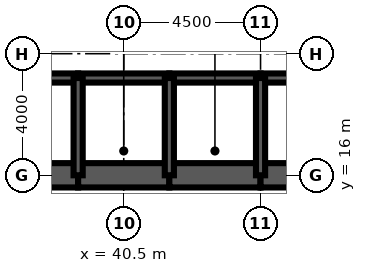
"""IFC4 building model, lengths in metres.
Left out: names, types, materials, properties, quantities, classifications, styles, units other than length and angle.
Written with IfcOpenShell. Run it as: python <this file> out.ifc"""

import sys

from ifc_helpers import new_model, si_unit, direction, frame, frame_2d, origin, place, context, subcontext, project, spatial, rectangle, extrude, element, fill, save


model = new_model("IFC4")
c1 = context("Model", 3, precision=1e-05, world=origin(), true_north=direction((0.0, 1.0)))
c2 = subcontext(c1, "Body", "Model", "MODEL_VIEW")
j1 = project(units=[si_unit("LENGTHUNIT", "METRE"), si_unit("PLANEANGLEUNIT", "RADIAN")], contexts=[c1])
p1 = place(None, origin())
s1 = spatial("IfcSite", under=j1, at=p1, CompositionType="ELEMENT")
p2 = place(p1, origin())
s2 = spatial("IfcBuilding", under=s1, at=p2, CompositionType="ELEMENT")
p3 = place(p2, frame((0.0, 0.0, 240.4)))
s3 = spatial("IfcBuildingStorey", under=s2, at=p3, CompositionType="ELEMENT", Elevation=240.4)
for number, where, z_axis, x_axis in (
    (1, (36.0, 16.0, 0.0), (0.0, 0.0, 1.0), (1.0, 0.0, 0.0)),
    (2, (39.0, 16.0, 0.0), (0.0, 0.0, 1.0), (1.0, 0.0, 0.0)),
    (3, (42.0, 16.0, 0.0), (0.0, 0.0, 1.0), (1.0, 0.0, 0.0)),
):
    element("IfcWall", number, at=place(p3, frame(where, z_axis=z_axis, x_axis=x_axis)), inside=s3, PredefinedType="SHEAR", context=c2, shape_type="SweptSolid", body=[
        extrude(rectangle(XDim=3.0, YDim=0.8, at=frame_2d((1.5, 0.0))), origin(), (0.0, 0.0, 1.0), 4.2),
    ])
p4 = place(p3, frame((45.0, 16.0, 0.0), z_axis=(0.0, 0.0, 1.0), x_axis=(1.0, 0.0, 0.0)))
e4 = element("IfcWall", 4, at=p4, inside=s3, PredefinedType="SHEAR", context=c2, shape_type="SweptSolid", body=[
    extrude(rectangle(XDim=9.4, YDim=0.8, at=frame_2d((4.7, 0.0))), origin(), (0.0, 0.0, 1.0), 4.2),
])
p5 = place(p3, frame((36.0, 19.2, 0.0), z_axis=(0.0, 0.0, 1.0), x_axis=(1.0, 0.0, 0.0)))
e5 = element("IfcWall", 5, at=p5, inside=s3, PredefinedType="SOLIDWALL", context=c2, shape_type="SweptSolid", body=[
    extrude(rectangle(XDim=3.0, YDim=0.3, at=frame_2d((1.5, 0.0))), origin(), (0.0, 0.0, 1.0), 4.2),
])
p6 = place(p5, frame((0.95, 0.0, 0.0)))
e6 = element("IfcOpeningElement", 6, at=p6, cuts=e5, PredefinedType="OPENING", context=c2, shape_type="SweptSolid", body=[
    extrude(rectangle(XDim=1.1, YDim=2.2, at=frame_2d((0.55, 1.1))), frame((0.0, 0.16, 0.0), z_axis=(0.0, -1.0, 0.0), x_axis=(1.0, 0.0, 0.0)), (0.0, 0.0, 1.0), 0.32),
])
p7 = place(p3, frame((39.0, 19.2, 0.0), z_axis=(0.0, 0.0, 1.0), x_axis=(1.0, 0.0, 0.0)))
e7 = element("IfcWall", 7, at=p7, inside=s3, PredefinedType="SOLIDWALL", context=c2, shape_type="SweptSolid", body=[
    extrude(rectangle(XDim=3.0, YDim=0.3, at=frame_2d((1.5, 0.0))), origin(), (0.0, 0.0, 1.0), 4.2),
])
p8 = place(p7, frame((1.0, 0.0, 0.0)))
e8 = element("IfcOpeningElement", 8, at=p8, cuts=e7, PredefinedType="OPENING", context=c2, shape_type="SweptSolid", body=[
    extrude(rectangle(XDim=1.0, YDim=2.1, at=frame_2d((0.5, 1.05))), frame((0.0, 0.16, 0.0), z_axis=(0.0, -1.0, 0.0), x_axis=(1.0, 0.0, 0.0)), (0.0, 0.0, 1.0), 0.32),
])
p9 = place(p3, frame((42.0, 19.2, 0.0), z_axis=(0.0, 0.0, 1.0), x_axis=(1.0, 0.0, 0.0)))
e9 = element("IfcWall", 9, at=p9, inside=s3, PredefinedType="SOLIDWALL", context=c2, shape_type="SweptSolid", body=[
    extrude(rectangle(XDim=3.0, YDim=0.3, at=frame_2d((1.5, 0.0))), origin(), (0.0, 0.0, 1.0), 4.2),
])
p10 = place(p9, frame((1.0, 0.0, 0.0)))
e10 = element("IfcOpeningElement", 10, at=p10, cuts=e9, PredefinedType="OPENING", context=c2, shape_type="SweptSolid", body=[
    extrude(rectangle(XDim=1.0, YDim=2.1, at=frame_2d((0.5, 1.05))), frame((0.0, 0.16, 0.0), z_axis=(0.0, -1.0, 0.0), x_axis=(1.0, 0.0, 0.0)), (0.0, 0.0, 1.0), 0.32),
])
p11 = place(p3, frame((45.0, 19.2, 0.0), z_axis=(0.0, 0.0, 1.0), x_axis=(1.0, 0.0, 0.0)))
e11 = element("IfcWall", 11, at=p11, inside=s3, PredefinedType="SOLIDWALL", context=c2, shape_type="SweptSolid", body=[
    extrude(rectangle(XDim=9.0, YDim=0.3, at=frame_2d((4.5, 0.0))), origin(), (0.0, 0.0, 1.0), 4.2),
])
p12 = place(p11, frame((7.35, 0.0, 0.0)))
e12 = element("IfcOpeningElement", 12, at=p12, cuts=e11, PredefinedType="OPENING", context=c2, shape_type="SweptSolid", body=[
    extrude(rectangle(XDim=1.0, YDim=2.1, at=frame_2d((0.5, 1.05))), frame((0.0, 0.16, 0.0), z_axis=(0.0, -1.0, 0.0), x_axis=(1.0, 0.0, 0.0)), (0.0, 0.0, 1.0), 0.32),
])
for number, where, z_axis, x_axis in (
    (13, (39.0, 16.0, 0.0), (0.0, 0.0, 1.0), (0.0, 1.0, 0.0)),
    (14, (42.0, 16.0, 0.0), (0.0, 0.0, 1.0), (0.0, 1.0, 0.0)),
    (15, (45.0, 16.0, 0.0), (0.0, 0.0, 1.0), (0.0, 1.0, 0.0)),
):
    element("IfcWall", number, at=place(p3, frame(where, z_axis=z_axis, x_axis=x_axis)), inside=s3, PredefinedType="SOLIDWALL", context=c2, shape_type="SweptSolid", body=[
        extrude(rectangle(XDim=3.2, YDim=0.3, at=frame_2d((1.6, 0.0))), origin(), (0.0, 0.0, 1.0), 4.2),
    ])
p13 = place(p3, frame((39.15, 17.35, 0.0), z_axis=(0.0, 0.0, 1.0), x_axis=(1.0, 0.0, 0.0)))
e16 = element("IfcWall", 16, at=p13, inside=s3, PredefinedType="SOLIDWALL", context=c2, shape_type="SweptSolid", body=[
    extrude(rectangle(XDim=2.7, YDim=0.3, at=frame_2d((1.35, 0.0))), origin(), (0.0, 0.0, 1.0), 4.04),
])
p14 = place(p13, frame((0.85, 0.0, 0.0)))
e17 = element("IfcOpeningElement", 17, at=p14, cuts=e16, PredefinedType="OPENING", context=c2, shape_type="SweptSolid", body=[
    extrude(rectangle(XDim=1.0, YDim=2.1, at=frame_2d((0.5, 1.05))), frame((0.0, 0.16, 0.0), z_axis=(0.0, -1.0, 0.0), x_axis=(1.0, 0.0, 0.0)), (0.0, 0.0, 1.0), 0.32),
])
p15 = place(p3, frame((42.15, 17.35, 0.0), z_axis=(0.0, 0.0, 1.0), x_axis=(1.0, 0.0, 0.0)))
e18 = element("IfcWall", 18, at=p15, inside=s3, PredefinedType="SOLIDWALL", context=c2, shape_type="SweptSolid", body=[
    extrude(rectangle(XDim=2.7, YDim=0.3, at=frame_2d((1.35, 0.0))), origin(), (0.0, 0.0, 1.0), 4.04),
])
p16 = place(p15, frame((0.85, 0.0, 0.0)))
e19 = element("IfcOpeningElement", 19, at=p16, cuts=e18, PredefinedType="OPENING", context=c2, shape_type="SweptSolid", body=[
    extrude(rectangle(XDim=1.0, YDim=2.1, at=frame_2d((0.5, 1.05))), frame((0.0, 0.16, 0.0), z_axis=(0.0, -1.0, 0.0), x_axis=(1.0, 0.0, 0.0)), (0.0, 0.0, 1.0), 0.32),
])
p17 = place(p14, origin())
e20 = element("IfcDoor", 20, at=p17, inside=s3, OperationType="SINGLE_SWING_LEFT", PredefinedType="DOOR", context=c2, shape_type="SweptSolid", body=[
    extrude(rectangle(XDim=1.0, YDim=2.1, at=frame_2d((0.5, 1.05))), frame((0.0, 0.025, 0.0), z_axis=(0.0, -1.0, 0.0), x_axis=(1.0, 0.0, 0.0)), (0.0, 0.0, 1.0), 0.05),
])
fill(e17, e20)
p18 = place(p16, origin())
e21 = element("IfcDoor", 21, at=p18, inside=s3, OperationType="SINGLE_SWING_LEFT", PredefinedType="DOOR", context=c2, shape_type="SweptSolid", body=[
    extrude(rectangle(XDim=1.0, YDim=2.1, at=frame_2d((0.5, 1.05))), frame((0.0, 0.025, 0.0), z_axis=(0.0, -1.0, 0.0), x_axis=(1.0, 0.0, 0.0)), (0.0, 0.0, 1.0), 0.05),
])
fill(e19, e21)
p19 = place(p8, origin())
e22 = element("IfcDoor", 22, at=p19, inside=s3, OperationType="SINGLE_SWING_LEFT", PredefinedType="DOOR", context=c2, shape_type="SweptSolid", body=[
    extrude(rectangle(XDim=1.0, YDim=2.1, at=frame_2d((0.5, 1.05))), frame((0.0, 0.025, 0.0), z_axis=(0.0, -1.0, 0.0), x_axis=(1.0, 0.0, 0.0)), (0.0, 0.0, 1.0), 0.05),
])
fill(e8, e22)
p20 = place(p10, origin())
e23 = element("IfcDoor", 23, at=p20, inside=s3, OperationType="SINGLE_SWING_LEFT", PredefinedType="DOOR", context=c2, shape_type="SweptSolid", body=[
    extrude(rectangle(XDim=1.0, YDim=2.1, at=frame_2d((0.5, 1.05))), frame((0.0, 0.025, 0.0), z_axis=(0.0, -1.0, 0.0), x_axis=(1.0, 0.0, 0.0)), (0.0, 0.0, 1.0), 0.05),
])
fill(e10, e23)
save(model, sys.argv[1])
